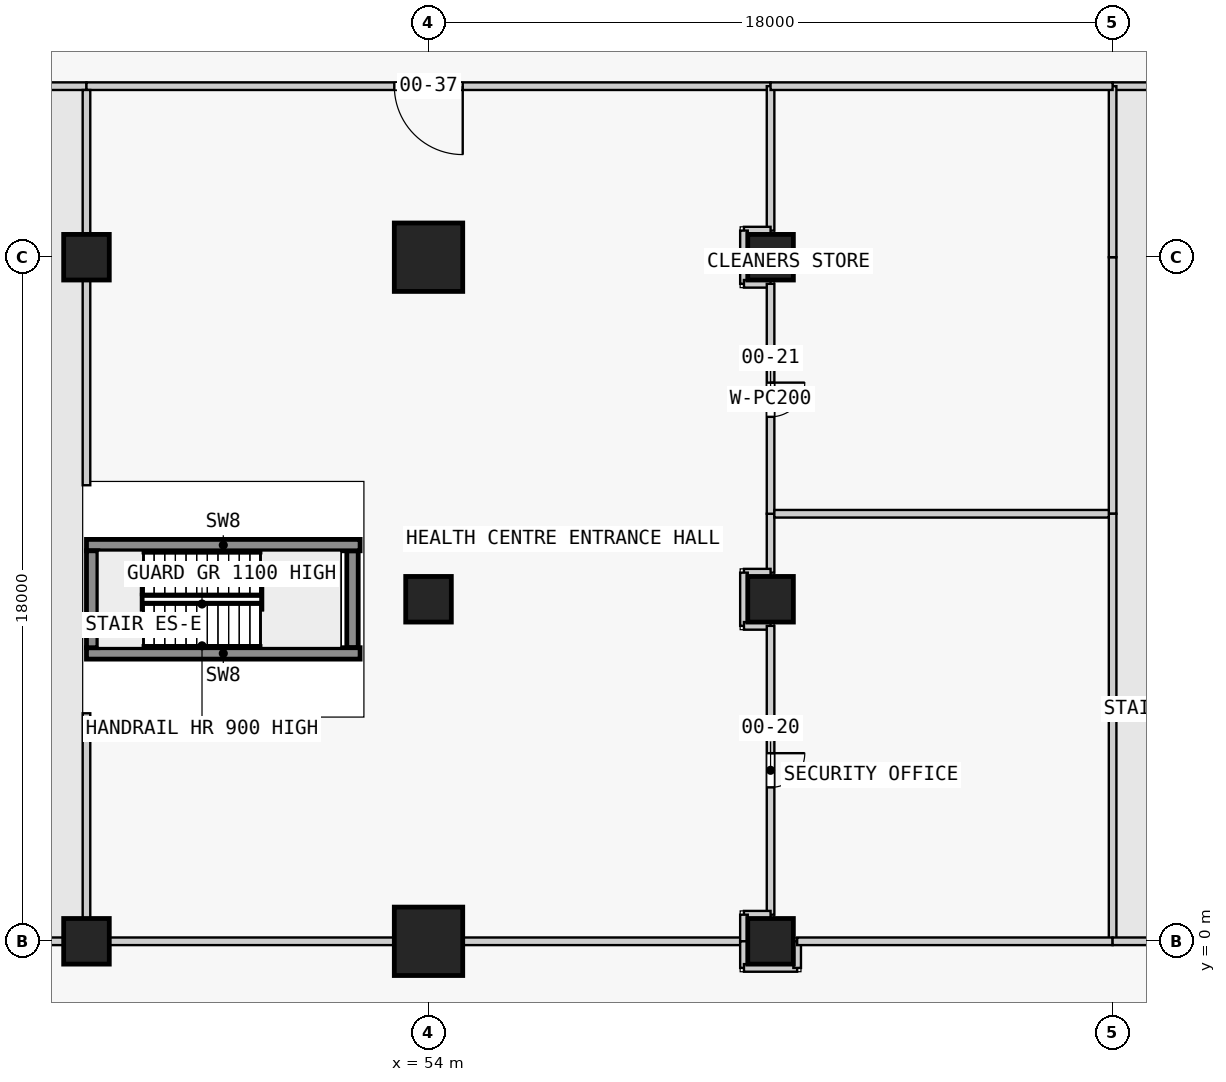
"""IFC4 building model, lengths in metres.
Left out: names, types, materials, properties, quantities, classifications, styles, units other than length and angle.
Written with IfcOpenShell. Run it as: python <this file> out.ifc"""

import sys

from ifc_helpers import new_model, si_unit, direction, frame, frame_2d, origin, origin_2d, place, context, subcontext, project, spatial, rectangle, extrude, element, fill, save


model = new_model("IFC4")
c1 = context("Model", 3, precision=1e-05, world=origin(), true_north=direction((0.0, 1.0)))
c2 = subcontext(c1, "Body", "Model", "MODEL_VIEW")
j1 = project(units=[si_unit("LENGTHUNIT", "METRE"), si_unit("PLANEANGLEUNIT", "RADIAN")], contexts=[c1])
p1 = place(None, origin())
s1 = spatial("IfcSite", under=j1, at=p1, CompositionType="ELEMENT")
p2 = place(p1, origin())
s2 = spatial("IfcBuilding", under=s1, at=p2, CompositionType="ELEMENT")
p3 = place(p2, origin())
s3 = spatial("IfcBuildingStorey", under=s2, at=p3, CompositionType="ELEMENT", Elevation=0.0)
for number, where, z_axis, x_axis in (
    (1, (45.0, 0.0, 0.0), (0.0, 0.0, 1.0), (1.0, 0.0, 0.0)),
    (2, (45.0, 18.0, 0.0), (0.0, 0.0, 1.0), (1.0, 0.0, 0.0)),
):
    element("IfcColumn", number, at=place(p3, frame(where, z_axis=z_axis, x_axis=x_axis)), inside=s3, PredefinedType="COLUMN", context=c2, shape_type="SweptSolid", body=[
        extrude(rectangle(XDim=1.2, YDim=1.2, at=origin_2d()), origin(), (0.0, 0.0, 1.0), 8.0),
    ])
p4 = place(p3, frame((54.0, 0.0, 0.0), z_axis=(0.0, 0.0, 1.0), x_axis=(1.0, 0.0, 0.0)))
e3 = element("IfcColumn", 3, at=p4, inside=s3, PredefinedType="COLUMN", context=c2, shape_type="SweptSolid", body=[
    extrude(rectangle(XDim=1.8, YDim=1.8, at=origin_2d()), origin(), (0.0, 0.0, 1.0), 8.0),
])
p5 = place(p3, frame((54.0, 9.0, 0.0), z_axis=(0.0, 0.0, 1.0), x_axis=(1.0, 0.0, 0.0)))
e4 = element("IfcColumn", 4, at=p5, inside=s3, PredefinedType="COLUMN", context=c2, shape_type="SweptSolid", body=[
    extrude(rectangle(XDim=1.2, YDim=1.2, at=origin_2d()), origin(), (0.0, 0.0, 1.0), 8.0),
])
p6 = place(p3, frame((54.0, 18.0, 0.0), z_axis=(0.0, 0.0, 1.0), x_axis=(1.0, 0.0, 0.0)))
e5 = element("IfcColumn", 5, at=p6, inside=s3, PredefinedType="COLUMN", context=c2, shape_type="SweptSolid", body=[
    extrude(rectangle(XDim=1.8, YDim=1.8, at=origin_2d()), origin(), (0.0, 0.0, 1.0), 8.0),
])
for number, where, z_axis, x_axis in (
    (6, (63.0, 0.0, 0.0), (0.0, 0.0, 1.0), (1.0, 0.0, 0.0)),
    (7, (63.0, 9.0, 0.0), (0.0, 0.0, 1.0), (1.0, 0.0, 0.0)),
    (8, (63.0, 18.0, 0.0), (0.0, 0.0, 1.0), (1.0, 0.0, 0.0)),
):
    element("IfcColumn", number, at=place(p3, frame(where, z_axis=z_axis, x_axis=x_axis)), inside=s3, PredefinedType="COLUMN", context=c2, shape_type="SweptSolid", body=[
        extrude(rectangle(XDim=1.2, YDim=1.2, at=origin_2d()), origin(), (0.0, 0.0, 1.0), 8.0),
    ])
for number, where, z_axis, x_axis in (
    (9, (45.15, 7.725, 0.0), (0.0, 0.0, 1.0), (0.0, 1.0, 0.0)),
    (10, (52.0, 7.725, 0.0), (0.0, 0.0, 1.0), (0.0, 1.0, 0.0)),
):
    element("IfcWall", number, at=place(p3, frame(where, z_axis=z_axis, x_axis=x_axis)), inside=s3, PredefinedType="SHEAR", context=c2, shape_type="SweptSolid", body=[
        extrude(rectangle(XDim=2.55, YDim=0.3, at=frame_2d((1.275, 0.0))), origin(), (0.0, 0.0, 1.0), 8.0),
    ])
for number, where, z_axis, x_axis in (
    (11, (45.0, 7.575, 0.0), (0.0, 0.0, 1.0), (1.0, 0.0, 0.0)),
    (12, (45.0, 10.425, 0.0), (0.0, 0.0, 1.0), (1.0, 0.0, 0.0)),
):
    element("IfcWall", number, at=place(p3, frame(where, z_axis=z_axis, x_axis=x_axis)), inside=s3, PredefinedType="SHEAR", context=c2, shape_type="SweptSolid", body=[
        extrude(rectangle(XDim=7.2, YDim=0.3, at=frame_2d((3.6, 0.0))), origin(), (0.0, 0.0, 1.0), 8.0),
    ])
p7 = place(p3, frame((45.0, 22.5, 0.0), z_axis=(0.0, 0.0, 1.0), x_axis=(-1.0, 0.0, 0.0)))
e13 = element("IfcWall", 13, at=p7, inside=s3, PredefinedType="PARTITIONING", context=c2, shape_type="SweptSolid", body=[
    extrude(rectangle(XDim=45.0, YDim=0.2, at=frame_2d((22.5, 0.0))), origin(), (0.0, 0.0, 1.0), 6.95),
])
p8 = place(p7, frame((21.6, 0.0, 0.0)))
e14 = element("IfcOpeningElement", 14, at=p8, cuts=e13, PredefinedType="OPENING", context=c2, shape_type="SweptSolid", body=[
    extrude(rectangle(XDim=1.8, YDim=2.1, at=frame_2d((0.9, 1.05))), frame((0.0, 0.11, 0.0), z_axis=(0.0, -1.0, 0.0), x_axis=(1.0, 0.0, 0.0)), (0.0, 0.0, 1.0), 0.22),
])
p9 = place(p3, frame((36.9, 0.0, 0.0), z_axis=(0.0, 0.0, 1.0), x_axis=(1.0, 0.0, 0.0)))
e15 = element("IfcWall", 15, at=p9, inside=s3, PredefinedType="PARTITIONING", context=c2, shape_type="SweptSolid", body=[
    extrude(rectangle(XDim=7.5, YDim=0.2, at=frame_2d((3.75, 0.0))), origin(), (0.0, 0.0, 1.0), 6.95),
])
p10 = place(p3, frame((74.1, 22.5, 0.0), z_axis=(0.0, 0.0, 1.0), x_axis=(-1.0, 0.0, 0.0)))
e16 = element("IfcWall", 16, at=p10, inside=s3, PredefinedType="PARTITIONING", context=c2, shape_type="SweptSolid", body=[
    extrude(rectangle(XDim=2.1, YDim=0.2, at=frame_2d((1.05, 0.0))), origin(), (0.0, 0.0, 1.0), 7.65),
])
p11 = place(p3, frame((63.0, 22.5, 0.0), z_axis=(0.0, 0.0, 1.0), x_axis=(-1.0, 0.0, 0.0)))
e17 = element("IfcWall", 17, at=p11, inside=s3, PredefinedType="PARTITIONING", context=c2, shape_type="SweptSolid", body=[
    extrude(rectangle(XDim=18.0, YDim=0.2, at=frame_2d((9.0, 0.0))), origin(), (0.0, 0.0, 1.0), 6.95),
])
p12 = place(p11, frame((8.1, 0.0, 0.0)))
e18 = element("IfcOpeningElement", 18, at=p12, cuts=e17, PredefinedType="OPENING", context=c2, shape_type="SweptSolid", body=[
    extrude(rectangle(XDim=1.8, YDim=2.1, at=frame_2d((0.9, 1.05))), frame((0.0, 0.11, 0.0), z_axis=(0.0, -1.0, 0.0), x_axis=(1.0, 0.0, 0.0)), (0.0, 0.0, 1.0), 0.22),
])
p13 = place(p3, frame((45.6, 0.0, 0.0), z_axis=(0.0, 0.0, 1.0), x_axis=(1.0, 0.0, 0.0)))
e19 = element("IfcWall", 19, at=p13, inside=s3, PredefinedType="PARTITIONING", context=c2, shape_type="SweptSolid", body=[
    extrude(rectangle(XDim=7.5, YDim=0.2, at=frame_2d((3.75, 0.0))), origin(), (0.0, 0.0, 1.0), 6.95),
])
p14 = place(p3, frame((54.9, 0.0, 0.0), z_axis=(0.0, 0.0, 1.0), x_axis=(1.0, 0.0, 0.0)))
e20 = element("IfcWall", 20, at=p14, inside=s3, PredefinedType="PARTITIONING", context=c2, shape_type="SweptSolid", body=[
    extrude(rectangle(XDim=7.4, YDim=0.2, at=frame_2d((3.7, 0.0))), origin(), (0.0, 0.0, 1.0), 6.95),
])
p15 = place(p3, frame((63.0, 11.25, 0.0), z_axis=(0.0, 0.0, 1.0), x_axis=(0.0, -1.0, 0.0)))
e21 = element("IfcWall", 21, at=p15, inside=s3, PredefinedType="PARTITIONING", context=c2, shape_type="SweptSolid", body=[
    extrude(rectangle(XDim=1.55, YDim=0.2, at=frame_2d((0.775, 0.0))), origin(), (0.0, 0.0, 1.0), 6.95),
])
p16 = place(p3, frame((63.0, 9.7, 0.0), z_axis=(0.0, 0.0, 1.0), x_axis=(-1.0, 0.0, 0.0)))
e22 = element("IfcWall", 22, at=p16, inside=s3, PredefinedType="PARTITIONING", context=c2, shape_type="SweptSolid", body=[
    extrude(rectangle(XDim=0.7, YDim=0.2, at=frame_2d((0.35, 0.0))), origin(), (0.0, 0.0, 1.0), 6.95),
])
p17 = place(p3, frame((62.3, 9.7, 0.0), z_axis=(0.0, 0.0, 1.0), x_axis=(0.0, -1.0, 0.0)))
e23 = element("IfcWall", 23, at=p17, inside=s3, PredefinedType="PARTITIONING", context=c2, shape_type="SweptSolid", body=[
    extrude(rectangle(XDim=1.4, YDim=0.2, at=frame_2d((0.7, 0.0))), origin(), (0.0, 0.0, 1.0), 6.95),
])
p18 = place(p3, frame((62.3, 8.3, 0.0), z_axis=(0.0, 0.0, 1.0), x_axis=(1.0, 0.0, 0.0)))
e24 = element("IfcWall", 24, at=p18, inside=s3, PredefinedType="PARTITIONING", context=c2, shape_type="SweptSolid", body=[
    extrude(rectangle(XDim=0.7, YDim=0.2, at=frame_2d((0.35, 0.0))), origin(), (0.0, 0.0, 1.0), 6.95),
])
p19 = place(p3, frame((63.0, 8.3, 0.0), z_axis=(0.0, 0.0, 1.0), x_axis=(0.0, -1.0, 0.0)))
e25 = element("IfcWall", 25, at=p19, inside=s3, PredefinedType="PARTITIONING", context=c2, shape_type="SweptSolid", body=[
    extrude(rectangle(XDim=7.6, YDim=0.2, at=frame_2d((3.8, 0.0))), origin(), (0.0, 0.0, 1.0), 6.95),
])
p20 = place(p19, frame((3.35, 0.0, 0.0)))
e26 = element("IfcOpeningElement", 26, at=p20, cuts=e25, PredefinedType="OPENING", context=c2, shape_type="SweptSolid", body=[
    extrude(rectangle(XDim=0.9, YDim=2.1, at=frame_2d((0.45, 1.05))), frame((0.0, 0.11, 0.0), z_axis=(0.0, -1.0, 0.0), x_axis=(1.0, 0.0, 0.0)), (0.0, 0.0, 1.0), 0.22),
])
for number, where, z_axis, x_axis in (
    (27, (63.0, 0.7, 0.0), (0.0, 0.0, 1.0), (-1.0, 0.0, 0.0)),
    (28, (62.3, 0.7, 0.0), (0.0, 0.0, 1.0), (0.0, -1.0, 0.0)),
):
    element("IfcWall", number, at=place(p3, frame(where, z_axis=z_axis, x_axis=x_axis)), inside=s3, PredefinedType="PARTITIONING", context=c2, shape_type="SweptSolid", body=[
        extrude(rectangle(XDim=0.7, YDim=0.2, at=frame_2d((0.35, 0.0))), origin(), (0.0, 0.0, 1.0), 6.95),
    ])
p21 = place(p3, frame((63.0, 22.5, 0.0), z_axis=(0.0, 0.0, 1.0), x_axis=(0.0, -1.0, 0.0)))
e29 = element("IfcWall", 29, at=p21, inside=s3, PredefinedType="PARTITIONING", context=c2, shape_type="SweptSolid", body=[
    extrude(rectangle(XDim=3.8, YDim=0.2, at=frame_2d((1.9, 0.0))), origin(), (0.0, 0.0, 1.0), 6.95),
])
p22 = place(p3, frame((63.0, 18.7, 0.0), z_axis=(0.0, 0.0, 1.0), x_axis=(-1.0, 0.0, 0.0)))
e30 = element("IfcWall", 30, at=p22, inside=s3, PredefinedType="PARTITIONING", context=c2, shape_type="SweptSolid", body=[
    extrude(rectangle(XDim=0.7, YDim=0.2, at=frame_2d((0.35, 0.0))), origin(), (0.0, 0.0, 1.0), 6.95),
])
p23 = place(p3, frame((62.3, 18.7, 0.0), z_axis=(0.0, 0.0, 1.0), x_axis=(0.0, -1.0, 0.0)))
e31 = element("IfcWall", 31, at=p23, inside=s3, PredefinedType="PARTITIONING", context=c2, shape_type="SweptSolid", body=[
    extrude(rectangle(XDim=1.4, YDim=0.2, at=frame_2d((0.7, 0.0))), origin(), (0.0, 0.0, 1.0), 6.95),
])
p24 = place(p3, frame((62.3, 17.3, 0.0), z_axis=(0.0, 0.0, 1.0), x_axis=(1.0, 0.0, 0.0)))
e32 = element("IfcWall", 32, at=p24, inside=s3, PredefinedType="PARTITIONING", context=c2, shape_type="SweptSolid", body=[
    extrude(rectangle(XDim=0.7, YDim=0.2, at=frame_2d((0.35, 0.0))), origin(), (0.0, 0.0, 1.0), 6.95),
])
p25 = place(p3, frame((63.0, 17.3, 0.0), z_axis=(0.0, 0.0, 1.0), x_axis=(0.0, -1.0, 0.0)))
e33 = element("IfcWall", 33, at=p25, inside=s3, PredefinedType="PARTITIONING", context=c2, shape_type="SweptSolid", body=[
    extrude(rectangle(XDim=6.05, YDim=0.2, at=frame_2d((3.025, 0.0))), origin(), (0.0, 0.0, 1.0), 6.95),
])
p26 = place(p25, frame((2.6, 0.0, 0.0)))
e34 = element("IfcOpeningElement", 34, at=p26, cuts=e33, PredefinedType="OPENING", context=c2, shape_type="SweptSolid", body=[
    extrude(rectangle(XDim=0.9, YDim=2.1, at=frame_2d((0.45, 1.05))), frame((0.0, 0.11, 0.0), z_axis=(0.0, -1.0, 0.0), x_axis=(1.0, 0.0, 0.0)), (0.0, 0.0, 1.0), 0.22),
])
p27 = place(p3, frame((72.0, 11.25, 0.0), z_axis=(0.0, 0.0, 1.0), x_axis=(0.0, 1.0, 0.0)))
e35 = element("IfcWall", 35, at=p27, inside=s3, PredefinedType="PARTITIONING", context=c2, shape_type="SweptSolid", body=[
    extrude(rectangle(XDim=6.75, YDim=0.2, at=frame_2d((3.375, 0.0))), origin(), (0.0, 0.0, 1.0), 7.65),
])
p28 = place(p3, frame((72.0, 18.0, 0.0), z_axis=(0.0, 0.0, 1.0), x_axis=(0.0, 1.0, 0.0)))
e36 = element("IfcWall", 36, at=p28, inside=s3, PredefinedType="PARTITIONING", context=c2, shape_type="SweptSolid", body=[
    extrude(rectangle(XDim=4.5, YDim=0.2, at=frame_2d((2.25, 0.0))), origin(), (0.0, 0.0, 1.0), 7.65),
])
p29 = place(p3, frame((72.0, 0.0, 0.0), z_axis=(0.0, 0.0, 1.0), x_axis=(0.0, 1.0, 0.0)))
e37 = element("IfcWall", 37, at=p29, inside=s3, PredefinedType="PARTITIONING", context=c2, shape_type="SweptSolid", body=[
    extrude(rectangle(XDim=11.25, YDim=0.2, at=frame_2d((5.625, 0.0))), origin(), (0.0, 0.0, 1.0), 7.65),
])
p30 = place(p3, frame((62.3, 0.0, 0.0), z_axis=(0.0, 0.0, 1.0), x_axis=(0.0, -1.0, 0.0)))
e38 = element("IfcWall", 38, at=p30, inside=s3, PredefinedType="PARTITIONING", context=c2, shape_type="SweptSolid", body=[
    extrude(rectangle(XDim=0.7, YDim=0.2, at=frame_2d((0.35, 0.0))), origin(), (0.0, 0.0, 1.0), 6.95),
])
p31 = place(p3, frame((62.3, -0.7, 0.0), z_axis=(0.0, 0.0, 1.0), x_axis=(1.0, 0.0, 0.0)))
e39 = element("IfcWall", 39, at=p31, inside=s3, PredefinedType="PARTITIONING", context=c2, shape_type="SweptSolid", body=[
    extrude(rectangle(XDim=1.4, YDim=0.2, at=frame_2d((0.7, 0.0))), origin(), (0.0, 0.0, 1.0), 6.95),
])
p32 = place(p3, frame((63.7, -0.7, 0.0), z_axis=(0.0, 0.0, 1.0), x_axis=(0.0, 1.0, 0.0)))
e40 = element("IfcWall", 40, at=p32, inside=s3, PredefinedType="PARTITIONING", context=c2, shape_type="SweptSolid", body=[
    extrude(rectangle(XDim=0.7, YDim=0.2, at=frame_2d((0.35, 0.0))), origin(), (0.0, 0.0, 1.0), 7.65),
])
p33 = place(p3, frame((63.7, 0.0, 0.0), z_axis=(0.0, 0.0, 1.0), x_axis=(1.0, 0.0, 0.0)))
e41 = element("IfcWall", 41, at=p33, inside=s3, PredefinedType="PARTITIONING", context=c2, shape_type="SweptSolid", body=[
    extrude(rectangle(XDim=8.3, YDim=0.2, at=frame_2d((4.15, 0.0))), origin(), (0.0, 0.0, 1.0), 7.65),
])
p34 = place(p3, frame((45.0, 22.4, 0.0), z_axis=(0.0, 0.0, 1.0), x_axis=(0.0, -1.0, 0.0)))
e42 = element("IfcWall", 42, at=p34, inside=s3, PredefinedType="PARTITIONING", context=c2, shape_type="SweptSolid", body=[
    extrude(rectangle(XDim=3.8, YDim=0.2, at=frame_2d((1.9, 0.0))), origin(), (0.0, 0.0, 1.0), 6.95),
])
p35 = place(p3, frame((45.0, 17.4, 0.0), z_axis=(0.0, 0.0, 1.0), x_axis=(0.0, -1.0, 0.0)))
e43 = element("IfcWall", 43, at=p35, inside=s3, PredefinedType="PARTITIONING", context=c2, shape_type="SweptSolid", body=[
    extrude(rectangle(XDim=5.4, YDim=0.2, at=frame_2d((2.7, 0.0))), origin(), (0.0, 0.0, 1.0), 7.65),
])
p36 = place(p3, frame((72.0, 22.5, 0.0), z_axis=(0.0, 0.0, 1.0), x_axis=(-1.0, 0.0, 0.0)))
e44 = element("IfcWall", 44, at=p36, inside=s3, PredefinedType="PARTITIONING", context=c2, shape_type="SweptSolid", body=[
    extrude(rectangle(XDim=9.0, YDim=0.2, at=frame_2d((4.5, 0.0))), origin(), (0.0, 0.0, 1.0), 6.95),
])
p37 = place(p3, frame((63.1, 11.25, 0.0), z_axis=(0.0, 0.0, 1.0), x_axis=(1.0, 0.0, 0.0)))
e45 = element("IfcWall", 45, at=p37, inside=s3, PredefinedType="PARTITIONING", context=c2, shape_type="SweptSolid", body=[
    extrude(rectangle(XDim=8.8, YDim=0.2, at=frame_2d((4.4, 0.0))), origin(), (0.0, 0.0, 1.0), 6.95),
])
p38 = place(p3, frame((45.0, 6.0, 0.0), z_axis=(0.0, 0.0, 1.0), x_axis=(0.0, -1.0, 0.0)))
e46 = element("IfcWall", 46, at=p38, inside=s3, PredefinedType="PARTITIONING", context=c2, shape_type="SweptSolid", body=[
    extrude(rectangle(XDim=5.4, YDim=0.2, at=frame_2d((2.7, 0.0))), origin(), (0.0, 0.0, 1.0), 7.65),
])
p39 = place(p3, frame((72.0, 0.0, 0.0), z_axis=(0.0, 0.0, 1.0), x_axis=(1.0, 0.0, 0.0)))
e47 = element("IfcWall", 47, at=p39, inside=s3, PredefinedType="PARTITIONING", context=c2, shape_type="SweptSolid", body=[
    extrude(rectangle(XDim=3.0, YDim=0.2, at=frame_2d((1.5, 0.0))), origin(), (0.0, 0.0, 1.0), 7.65),
])
p40 = place(p20, origin())
e48 = element("IfcDoor", 48, at=p40, inside=s3, OperationType="SINGLE_SWING_LEFT", PredefinedType="DOOR", context=c2, shape_type="SweptSolid", body=[
    extrude(rectangle(XDim=0.9, YDim=2.1, at=frame_2d((0.45, 1.05))), frame((0.0, 0.025, 0.0), z_axis=(0.0, -1.0, 0.0), x_axis=(1.0, 0.0, 0.0)), (0.0, 0.0, 1.0), 0.05),
])
fill(e26, e48)
p41 = place(p26, origin())
e49 = element("IfcDoor", 49, at=p41, inside=s3, OperationType="SINGLE_SWING_LEFT", PredefinedType="DOOR", context=c2, shape_type="SweptSolid", body=[
    extrude(rectangle(XDim=0.9, YDim=2.1, at=frame_2d((0.45, 1.05))), frame((0.0, 0.025, 0.0), z_axis=(0.0, -1.0, 0.0), x_axis=(1.0, 0.0, 0.0)), (0.0, 0.0, 1.0), 0.05),
])
fill(e34, e49)
p42 = place(p12, origin())
e50 = element("IfcDoor", 50, at=p42, inside=s3, OperationType="DOUBLE_DOOR_SINGLE_SWING", PredefinedType="DOOR", context=c2, shape_type="SweptSolid", body=[
    extrude(rectangle(XDim=1.8, YDim=2.1, at=frame_2d((0.9, 1.05))), frame((0.0, 0.025, 0.0), z_axis=(0.0, -1.0, 0.0), x_axis=(1.0, 0.0, 0.0)), (0.0, 0.0, 1.0), 0.05),
])
fill(e18, e50)
save(model, sys.argv[1])
